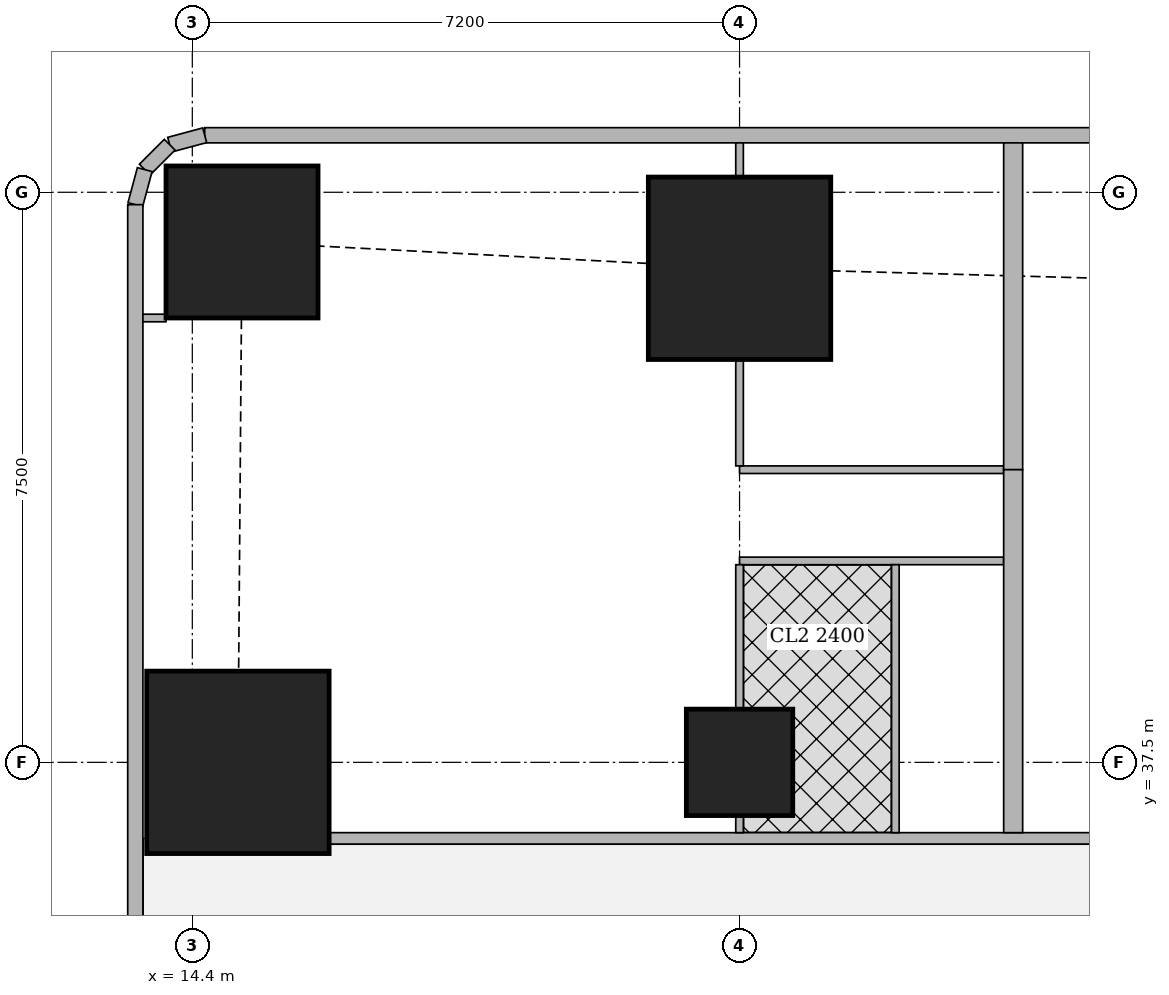
"""IFC4 building model, lengths in metres.
Left out: names, types, materials, properties, quantities, classifications, styles, units other than length and angle.
Written with IfcOpenShell. Run it as: python <this file> out.ifc"""

import sys

from ifc_helpers import new_model, si_unit, direction, frame, frame_2d, origin, origin_2d, place, context, subcontext, project, spatial, rectangle, extrude, element, fill, save


model = new_model("IFC4")
c1 = context("Model", 3, precision=1e-05, world=origin(), true_north=direction((0.0, 1.0)))
c2 = subcontext(c1, "Body", "Model", "MODEL_VIEW")
j1 = project(units=[si_unit("LENGTHUNIT", "METRE"), si_unit("PLANEANGLEUNIT", "RADIAN")], contexts=[c1])
p1 = place(None, origin())
s1 = spatial("IfcSite", under=j1, at=p1, CompositionType="ELEMENT")
p2 = place(p1, origin())
s2 = spatial("IfcBuilding", under=s1, at=p2, CompositionType="ELEMENT")
p3 = place(p2, frame((0.0, 0.0, 223.7)))
s3 = spatial("IfcBuildingStorey", under=s2, at=p3, CompositionType="ELEMENT", Elevation=223.7)
p4 = place(p3, frame((15.0, 37.5, 0.0), z_axis=(0.0, 0.0, 1.0), x_axis=(1.0, 0.0, 0.0)))
e1 = element("IfcColumn", 1, at=p4, inside=s3, PredefinedType="COLUMN", context=c2, shape_type="SweptSolid", body=[
    extrude(rectangle(XDim=2.4, YDim=2.4, at=origin_2d()), origin(), (0.0, 0.0, 1.0), 3.75),
])
p5 = place(p3, frame((21.6, 37.5, 0.0), z_axis=(0.0, 0.0, 1.0), x_axis=(1.0, 0.0, 0.0)))
e2 = element("IfcColumn", 2, at=p5, inside=s3, PredefinedType="COLUMN", context=c2, shape_type="SweptSolid", body=[
    extrude(rectangle(XDim=1.4, YDim=1.4, at=origin_2d()), origin(), (0.0, 0.0, 1.0), 3.75),
])
p6 = place(p3, frame((15.054, 44.346, 0.0), z_axis=(0.0, 0.0, 1.0), x_axis=(1.0, 0.0, 0.0)))
e3 = element("IfcColumn", 3, at=p6, inside=s3, PredefinedType="COLUMN", context=c2, shape_type="SweptSolid", body=[
    extrude(rectangle(XDim=2.0, YDim=2.0, at=origin_2d()), origin(), (0.0, 0.0, 1.0), 3.75),
])
p7 = place(p3, frame((21.6, 44.0, 0.0), z_axis=(0.0, 0.0, 1.0), x_axis=(1.0, 0.0, 0.0)))
e4 = element("IfcColumn", 4, at=p7, inside=s3, PredefinedType="COLUMN", context=c2, shape_type="SweptSolid", body=[
    extrude(rectangle(XDim=2.4, YDim=2.4, at=origin_2d()), origin(), (0.0, 0.0, 1.0), 3.75),
])
p8 = place(p3, frame((40.106, 45.75, 0.0), z_axis=(0.0, 0.0, 1.0), x_axis=(-1.0, 0.0, 0.0)))
e5 = element("IfcWall", 5, at=p8, inside=s3, PredefinedType="SOLIDWALL", context=c2, shape_type="SweptSolid", body=[
    extrude(rectangle(XDim=25.543, YDim=0.2, at=frame_2d((12.771, 0.0))), origin(), (0.0, 0.0, 1.0), 3.5),
])
p9 = place(p8, frame((8.606, 0.0, 0.9)))
e6 = element("IfcOpeningElement", 6, at=p9, cuts=e5, PredefinedType="OPENING", context=c2, shape_type="SweptSolid", body=[
    extrude(rectangle(XDim=1.8, YDim=1.5, at=frame_2d((0.9, 0.75))), frame((0.0, 0.11, 0.0), z_axis=(0.0, -1.0, 0.0), x_axis=(1.0, 0.0, 0.0)), (0.0, 0.0, 1.0), 0.22),
])
p10 = place(p8, frame((12.206, 0.0, 0.9)))
e7 = element("IfcOpeningElement", 7, at=p10, cuts=e5, PredefinedType="OPENING", context=c2, shape_type="SweptSolid", body=[
    extrude(rectangle(XDim=1.8, YDim=1.5, at=frame_2d((0.9, 0.75))), frame((0.0, 0.11, 0.0), z_axis=(0.0, -1.0, 0.0), x_axis=(1.0, 0.0, 0.0)), (0.0, 0.0, 1.0), 0.22),
])
p11 = place(p8, frame((15.806, 0.0, 0.9)))
e8 = element("IfcOpeningElement", 8, at=p11, cuts=e5, PredefinedType="OPENING", context=c2, shape_type="SweptSolid", body=[
    extrude(rectangle(XDim=1.8, YDim=1.5, at=frame_2d((0.9, 0.75))), frame((0.0, 0.11, 0.0), z_axis=(0.0, -1.0, 0.0), x_axis=(1.0, 0.0, 0.0)), (0.0, 0.0, 1.0), 0.22),
])
p12 = place(p8, frame((20.825, 0.0, 0.9)))
e9 = element("IfcOpeningElement", 9, at=p12, cuts=e5, PredefinedType="OPENING", context=c2, shape_type="SweptSolid", body=[
    extrude(rectangle(XDim=2.4, YDim=1.5, at=frame_2d((1.2, 0.75))), frame((0.0, 0.11, 0.0), z_axis=(0.0, -1.0, 0.0), x_axis=(1.0, 0.0, 0.0)), (0.0, 0.0, 1.0), 0.22),
])
p13 = place(p3, frame((14.563, 45.75, 0.0), z_axis=(0.0, 0.0, 1.0), x_axis=(-0.965655254015, -0.259826731483, 0.0)))
e10 = element("IfcWall", 10, at=p13, inside=s3, PredefinedType="SOLIDWALL", context=c2, shape_type="SweptSolid", body=[
    extrude(rectangle(XDim=0.477, YDim=0.2, at=frame_2d((0.239, 0.0))), origin(), (0.0, 0.0, 1.0), 3.5),
])
p14 = place(p3, frame((14.102, 45.626, 0.0), z_axis=(0.0, 0.0, 1.0), x_axis=(-0.707369890659, -0.706843573776, 0.0)))
e11 = element("IfcWall", 11, at=p14, inside=s3, PredefinedType="SOLIDWALL", context=c2, shape_type="SweptSolid", body=[
    extrude(rectangle(XDim=0.464, YDim=0.2, at=frame_2d((0.232, 0.0))), origin(), (0.0, 0.0, 1.0), 3.5),
])
p15 = place(p3, frame((13.774, 45.298, 0.0), z_axis=(0.0, 0.0, 1.0), x_axis=(-0.259698463175, -0.965689757751, 0.0)))
e12 = element("IfcWall", 12, at=p15, inside=s3, PredefinedType="SOLIDWALL", context=c2, shape_type="SweptSolid", body=[
    extrude(rectangle(XDim=0.478, YDim=0.2, at=frame_2d((0.239, 0.0))), origin(), (0.0, 0.0, 1.0), 3.5),
])
p16 = place(p3, frame((13.65, 44.837, 0.0), z_axis=(0.0, 0.0, 1.0), x_axis=(0.0, -1.0, 0.0)))
e13 = element("IfcWall", 13, at=p16, inside=s3, PredefinedType="SOLIDWALL", context=c2, shape_type="SweptSolid", body=[
    extrude(rectangle(XDim=44.674, YDim=0.2, at=frame_2d((22.337, 0.0))), origin(), (0.0, 0.0, 1.0), 3.5),
])
p17 = place(p16, frame((2.614, 0.0, 0.9)))
e14 = element("IfcOpeningElement", 14, at=p17, cuts=e13, PredefinedType="OPENING", context=c2, shape_type="SweptSolid", body=[
    extrude(rectangle(XDim=2.4, YDim=1.5, at=frame_2d((1.2, 0.75))), frame((0.0, 0.11, 0.0), z_axis=(0.0, -1.0, 0.0), x_axis=(1.0, 0.0, 0.0)), (0.0, 0.0, 1.0), 0.22),
])
p18 = place(p16, frame((39.333, 0.0, 0.9)))
e15 = element("IfcOpeningElement", 15, at=p18, cuts=e13, PredefinedType="OPENING", context=c2, shape_type="SweptSolid", body=[
    extrude(rectangle(XDim=2.4, YDim=1.5, at=frame_2d((1.2, 0.75))), frame((0.0, 0.11, 0.0), z_axis=(0.0, -1.0, 0.0), x_axis=(1.0, 0.0, 0.0)), (0.0, 0.0, 1.0), 0.22),
])
p19 = place(p16, frame((33.087, 0.0, 0.0)))
e16 = element("IfcOpeningElement", 16, at=p19, cuts=e13, PredefinedType="OPENING", context=c2, shape_type="SweptSolid", body=[
    extrude(rectangle(XDim=1.0, YDim=2.4, at=frame_2d((0.5, 1.2))), frame((0.0, 0.11, 0.0), z_axis=(0.0, -1.0, 0.0), x_axis=(1.0, 0.0, 0.0)), (0.0, 0.0, 1.0), 0.22),
])
p20 = place(p16, frame((10.587, 0.0, 0.0)))
e17 = element("IfcOpeningElement", 17, at=p20, cuts=e13, PredefinedType="OPENING", context=c2, shape_type="SweptSolid", body=[
    extrude(rectangle(XDim=1.0, YDim=2.4, at=frame_2d((0.5, 1.2))), frame((0.0, 0.11, 0.0), z_axis=(0.0, -1.0, 0.0), x_axis=(1.0, 0.0, 0.0)), (0.0, 0.0, 1.0), 0.22),
])
p21 = place(p3, frame((16.201, 36.5, 0.0), z_axis=(0.0, 0.0, 1.0), x_axis=(1.0, 0.0, 0.0)))
e18 = element("IfcWall", 18, at=p21, inside=s3, PredefinedType="SOLIDWALL", context=c2, shape_type="SweptSolid", body=[
    extrude(rectangle(XDim=18.564, YDim=0.15, at=frame_2d((9.282, 0.0))), origin(), (0.0, 0.0, 1.0), 3.5),
])
p22 = place(p21, frame((0.874, 0.0, 0.0)))
e19 = element("IfcOpeningElement", 19, at=p22, cuts=e18, PredefinedType="OPENING", context=c2, shape_type="SweptSolid", body=[
    extrude(rectangle(XDim=1.0, YDim=2.1, at=frame_2d((0.5, 1.05))), frame((0.0, 0.085, 0.0), z_axis=(0.0, -1.0, 0.0), x_axis=(1.0, 0.0, 0.0)), (0.0, 0.0, 1.0), 0.17),
])
p23 = place(p21, frame((10.156, 0.0, 0.0)))
e20 = element("IfcOpeningElement", 20, at=p23, cuts=e18, PredefinedType="OPENING", context=c2, shape_type="SweptSolid", body=[
    extrude(rectangle(XDim=1.0, YDim=2.1, at=frame_2d((0.5, 1.05))), frame((0.0, 0.085, 0.0), z_axis=(0.0, -1.0, 0.0), x_axis=(1.0, 0.0, 0.0)), (0.0, 0.0, 1.0), 0.17),
])
p24 = place(p3, frame((14.054, 43.346, 0.0), z_axis=(0.0, 0.0, 1.0), x_axis=(-1.0, 0.0, 0.0)))
e21 = element("IfcWall", 21, at=p24, inside=s3, PredefinedType="PARTITIONING", context=c2, shape_type="SweptSolid", body=[
    extrude(rectangle(XDim=0.304, YDim=0.1, at=frame_2d((0.152, 0.0))), origin(), (0.0, 0.0, 1.0), 2.05),
])
p25 = place(p3, frame((21.6, 41.35, 0.0), z_axis=(0.0, 0.0, 1.0), x_axis=(1.0, 0.0, 0.0)))
e22 = element("IfcWall", 22, at=p25, inside=s3, PredefinedType="PARTITIONING", context=c2, shape_type="SweptSolid", body=[
    extrude(rectangle(XDim=3.475, YDim=0.1, at=frame_2d((1.737, 0.0))), origin(), (0.0, 0.0, 1.0), 3.5),
])
p26 = place(p25, frame((0.2, 0.0, 0.0)))
e23 = element("IfcOpeningElement", 23, at=p26, cuts=e22, PredefinedType="OPENING", context=c2, shape_type="SweptSolid", body=[
    extrude(rectangle(XDim=0.9, YDim=2.1, at=frame_2d((0.45, 1.05))), frame((0.0, 0.06, 0.0), z_axis=(0.0, -1.0, 0.0), x_axis=(1.0, 0.0, 0.0)), (0.0, 0.0, 1.0), 0.12),
])
p27 = place(p3, frame((21.6, 40.15, 0.0), z_axis=(0.0, 0.0, 1.0), x_axis=(1.0, 0.0, 0.0)))
e24 = element("IfcWall", 24, at=p27, inside=s3, PredefinedType="PARTITIONING", context=c2, shape_type="SweptSolid", body=[
    extrude(rectangle(XDim=3.475, YDim=0.1, at=frame_2d((1.737, 0.0))), origin(), (0.0, 0.0, 1.0), 3.5),
])
p28 = place(p27, frame((0.575, 0.0, 0.0)))
e25 = element("IfcOpeningElement", 25, at=p28, cuts=e24, PredefinedType="OPENING", context=c2, shape_type="SweptSolid", body=[
    extrude(rectangle(XDim=0.9, YDim=2.1, at=frame_2d((0.45, 1.05))), frame((0.0, 0.06, 0.0), z_axis=(0.0, -1.0, 0.0), x_axis=(1.0, 0.0, 0.0)), (0.0, 0.0, 1.0), 0.12),
])
p29 = place(p27, frame((2.375, 0.0, 0.0)))
e26 = element("IfcOpeningElement", 26, at=p29, cuts=e24, PredefinedType="OPENING", context=c2, shape_type="SweptSolid", body=[
    extrude(rectangle(XDim=0.9, YDim=2.1, at=frame_2d((0.45, 1.05))), frame((0.0, 0.06, 0.0), z_axis=(0.0, -1.0, 0.0), x_axis=(1.0, 0.0, 0.0)), (0.0, 0.0, 1.0), 0.12),
])
p30 = place(p3, frame((21.6, 41.4, 0.0), z_axis=(0.0, 0.0, 1.0), x_axis=(0.0, 1.0, 0.0)))
e27 = element("IfcWall", 27, at=p30, inside=s3, PredefinedType="PARTITIONING", context=c2, shape_type="SweptSolid", body=[
    extrude(rectangle(XDim=1.399, YDim=0.1, at=frame_2d((0.7, 0.0))), origin(), (0.0, 0.0, 1.0), 3.5),
])
p31 = place(p3, frame((21.6, 45.201, 0.0), z_axis=(0.0, 0.0, 1.0), x_axis=(0.0, 1.0, 0.0)))
e28 = element("IfcWall", 28, at=p31, inside=s3, PredefinedType="PARTITIONING", context=c2, shape_type="SweptSolid", body=[
    extrude(rectangle(XDim=0.449, YDim=0.1, at=frame_2d((0.225, 0.0))), origin(), (0.0, 0.0, 1.0), 3.5),
])
p32 = place(p3, frame((21.6, 36.575, 0.0), z_axis=(0.0, 0.0, 1.0), x_axis=(0.0, 1.0, 0.0)))
e29 = element("IfcWall", 29, at=p32, inside=s3, PredefinedType="PARTITIONING", context=c2, shape_type="SweptSolid", body=[
    extrude(rectangle(XDim=0.224, YDim=0.1, at=frame_2d((0.112, 0.0))), origin(), (0.0, 0.0, 1.0), 3.5),
])
p33 = place(p3, frame((21.6, 38.201, 0.0), z_axis=(0.0, 0.0, 1.0), x_axis=(0.0, 1.0, 0.0)))
e30 = element("IfcWall", 30, at=p33, inside=s3, PredefinedType="PARTITIONING", context=c2, shape_type="SweptSolid", body=[
    extrude(rectangle(XDim=1.899, YDim=0.1, at=frame_2d((0.95, 0.0))), origin(), (0.0, 0.0, 1.0), 3.5),
])
p34 = place(p3, frame((23.65, 36.575, 0.0), z_axis=(0.0, 0.0, 1.0), x_axis=(0.0, 1.0, 0.0)))
e31 = element("IfcWall", 31, at=p34, inside=s3, PredefinedType="PARTITIONING", context=c2, shape_type="SweptSolid", body=[
    extrude(rectangle(XDim=3.525, YDim=0.1, at=frame_2d((1.763, 0.0))), origin(), (0.0, 0.0, 1.0), 3.5),
])
p35 = place(p3, frame((25.2, 41.35, 0.0), z_axis=(0.0, 0.0, 1.0), x_axis=(0.0, 1.0, 0.0)))
e32 = element("IfcWall", 32, at=p35, inside=s3, PredefinedType="SOLIDWALL", context=c2, shape_type="SweptSolid", body=[
    extrude(rectangle(XDim=4.3, YDim=0.25, at=frame_2d((2.15, 0.0))), origin(), (0.0, 0.0, 1.0), 2.05),
])
p36 = place(p3, frame((25.2, 36.575, 0.0), z_axis=(0.0, 0.0, 1.0), x_axis=(0.0, 1.0, 0.0)))
e33 = element("IfcWall", 33, at=p36, inside=s3, PredefinedType="SOLIDWALL", context=c2, shape_type="SweptSolid", body=[
    extrude(rectangle(XDim=4.775, YDim=0.25, at=frame_2d((2.388, 0.0))), origin(), (0.0, 0.0, 1.0), 3.5),
])
p37 = place(p10, origin())
e34 = element("IfcWindow", 34, at=p37, inside=s3, PartitioningType="SINGLE_PANEL", PredefinedType="WINDOW", context=c2, shape_type="SweptSolid", body=[
    extrude(rectangle(XDim=1.8, YDim=1.5, at=frame_2d((0.9, 0.75))), frame((0.0, 0.03, 0.0), z_axis=(0.0, -1.0, 0.0), x_axis=(1.0, 0.0, 0.0)), (0.0, 0.0, 1.0), 0.06),
])
fill(e7, e34)
p38 = place(p11, origin())
e35 = element("IfcWindow", 35, at=p38, inside=s3, PartitioningType="SINGLE_PANEL", PredefinedType="WINDOW", context=c2, shape_type="SweptSolid", body=[
    extrude(rectangle(XDim=1.8, YDim=1.5, at=frame_2d((0.9, 0.75))), frame((0.0, 0.03, 0.0), z_axis=(0.0, -1.0, 0.0), x_axis=(1.0, 0.0, 0.0)), (0.0, 0.0, 1.0), 0.06),
])
fill(e8, e35)
p39 = place(p12, origin())
e36 = element("IfcWindow", 36, at=p39, inside=s3, PartitioningType="SINGLE_PANEL", PredefinedType="WINDOW", context=c2, shape_type="SweptSolid", body=[
    extrude(rectangle(XDim=2.4, YDim=1.5, at=frame_2d((1.2, 0.75))), frame((0.0, 0.03, 0.0), z_axis=(0.0, -1.0, 0.0), x_axis=(1.0, 0.0, 0.0)), (0.0, 0.0, 1.0), 0.06),
])
fill(e9, e36)
p40 = place(p17, origin())
e37 = element("IfcWindow", 37, at=p40, inside=s3, PartitioningType="SINGLE_PANEL", PredefinedType="WINDOW", context=c2, shape_type="SweptSolid", body=[
    extrude(rectangle(XDim=2.4, YDim=1.5, at=frame_2d((1.2, 0.75))), frame((0.0, 0.03, 0.0), z_axis=(0.0, -1.0, 0.0), x_axis=(1.0, 0.0, 0.0)), (0.0, 0.0, 1.0), 0.06),
])
fill(e14, e37)
p41 = place(p26, origin())
e38 = element("IfcDoor", 38, at=p41, inside=s3, OperationType="SINGLE_SWING_LEFT", PredefinedType="DOOR", context=c2, shape_type="SweptSolid", body=[
    extrude(rectangle(XDim=0.9, YDim=2.1, at=frame_2d((0.45, 1.05))), frame((0.0, 0.025, 0.0), z_axis=(0.0, -1.0, 0.0), x_axis=(1.0, 0.0, 0.0)), (0.0, 0.0, 1.0), 0.05),
])
fill(e23, e38)
p42 = place(p28, origin())
e39 = element("IfcDoor", 39, at=p42, inside=s3, OperationType="SINGLE_SWING_RIGHT", PredefinedType="DOOR", context=c2, shape_type="SweptSolid", body=[
    extrude(rectangle(XDim=0.9, YDim=2.1, at=frame_2d((0.45, 1.05))), frame((0.0, 0.025, 0.0), z_axis=(0.0, -1.0, 0.0), x_axis=(1.0, 0.0, 0.0)), (0.0, 0.0, 1.0), 0.05),
])
fill(e25, e39)
p43 = place(p29, origin())
e40 = element("IfcDoor", 40, at=p43, inside=s3, OperationType="SINGLE_SWING_LEFT", PredefinedType="DOOR", context=c2, shape_type="SweptSolid", body=[
    extrude(rectangle(XDim=0.9, YDim=2.1, at=frame_2d((0.45, 1.05))), frame((0.0, 0.025, 0.0), z_axis=(0.0, -1.0, 0.0), x_axis=(1.0, 0.0, 0.0)), (0.0, 0.0, 1.0), 0.05),
])
fill(e26, e40)
p44 = place(p22, origin())
e41 = element("IfcDoor", 41, at=p44, inside=s3, OperationType="SINGLE_SWING_LEFT", PredefinedType="DOOR", context=c2, shape_type="SweptSolid", body=[
    extrude(rectangle(XDim=1.0, YDim=2.1, at=frame_2d((0.5, 1.05))), frame((0.0, 0.025, 0.0), z_axis=(0.0, -1.0, 0.0), x_axis=(1.0, 0.0, 0.0)), (0.0, 0.0, 1.0), 0.05),
])
fill(e19, e41)
save(model, sys.argv[1])
